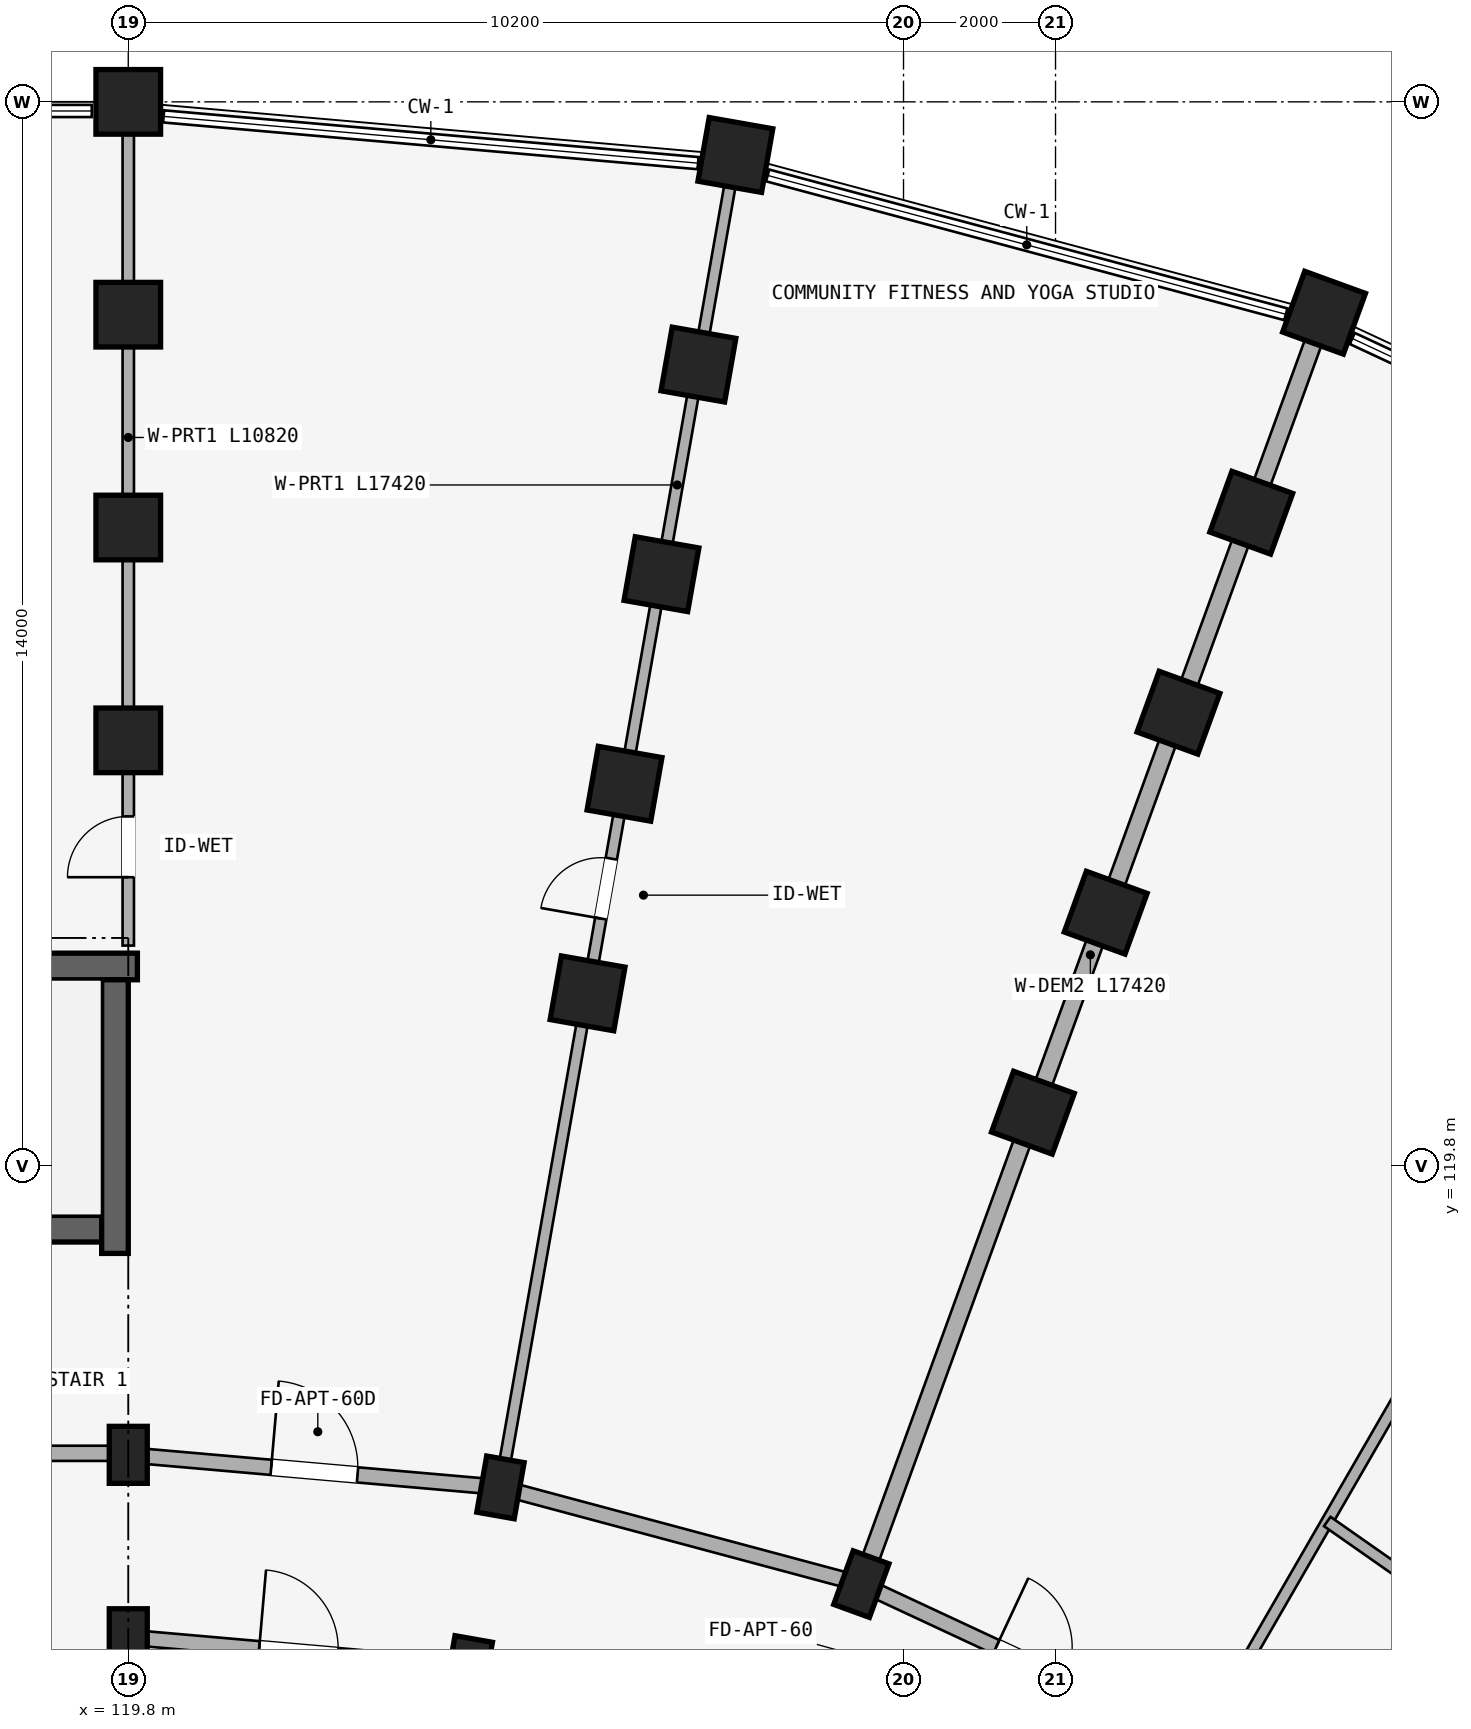
"""IFC4 building model, lengths in metres.
Left out: names, types, materials, properties, quantities, classifications, styles, units other than length and angle.
Written with IfcOpenShell. Run it as: python <this file> out.ifc"""

import sys

from ifc_helpers import new_model, si_unit, direction, frame, frame_2d, origin, origin_2d, place, context, subcontext, project, spatial, rectangle, extrude, element, fill, save


model = new_model("IFC4")
c1 = context("Model", 3, precision=1e-05, world=origin(), true_north=direction((0.0, 1.0)))
c2 = subcontext(c1, "Body", "Model", "MODEL_VIEW")
j1 = project(units=[si_unit("LENGTHUNIT", "METRE"), si_unit("PLANEANGLEUNIT", "RADIAN")], contexts=[c1])
p1 = place(None, origin())
s1 = spatial("IfcSite", under=j1, at=p1, CompositionType="ELEMENT")
p2 = place(p1, origin())
s2 = spatial("IfcBuilding", under=s1, at=p2, CompositionType="ELEMENT")
p3 = place(p2, frame((0.0, 0.0, 4.5)))
s3 = spatial("IfcBuildingStorey", under=s2, at=p3, CompositionType="ELEMENT", Elevation=4.5)
p4 = place(p3, frame((119.92, 122.425, 0.0), z_axis=(0.0, 0.0, 1.0), x_axis=(-1.0, 0.0, 0.0)))
e1 = element("IfcWall", 1, at=p4, inside=s3, PredefinedType="SHEAR", context=c2, shape_type="SweptSolid", body=[
    extrude(rectangle(XDim=8.545, YDim=0.35, at=frame_2d((4.272, 0.0))), origin(), (0.0, 0.0, 1.0), 3.98),
])
p5 = place(p3, frame((119.45, 118.975, 0.0), z_axis=(0.0, 0.0, 1.0), x_axis=(-1.0, 0.0, 0.0)))
e2 = element("IfcWall", 2, at=p5, inside=s3, PredefinedType="SHEAR", context=c2, shape_type="SweptSolid", body=[
    extrude(rectangle(XDim=8.075, YDim=0.35, at=frame_2d((4.038, 0.0))), origin(), (0.0, 0.0, 1.0), 3.98),
])
p6 = place(p5, frame((6.38, 0.0, 0.0)))
e3 = element("IfcOpeningElement", 3, at=p6, cuts=e2, PredefinedType="OPENING", context=c2, shape_type="SweptSolid", body=[
    extrude(rectangle(XDim=1.24, YDim=2.15, at=frame_2d((0.62, 1.075))), frame((0.0, 0.185, 0.0), z_axis=(0.0, -1.0, 0.0), x_axis=(1.0, 0.0, 0.0)), (0.0, 0.0, 1.0), 0.37),
])
p7 = place(p3, frame((119.625, 118.65, 0.0), z_axis=(0.0, 0.0, 1.0), x_axis=(0.0, 1.0, 0.0)))
e4 = element("IfcWall", 4, at=p7, inside=s3, PredefinedType="SHEAR", context=c2, shape_type="SweptSolid", body=[
    extrude(rectangle(XDim=3.6, YDim=0.35, at=frame_2d((1.8, 0.0))), origin(), (0.0, 0.0, 1.0), 3.98),
])
for number, where, z_axis, x_axis in (
    (5, (119.8, 113.6, 0.0), (0.0, 0.0, 1.0), (1.0, 0.0, 0.0)),
    (6, (119.8, 116.0, 0.0), (0.0, 0.0, 1.0), (1.0, 0.0, 0.0)),
):
    element("IfcColumn", number, at=place(p3, frame(where, z_axis=z_axis, x_axis=x_axis)), inside=s3, PredefinedType="COLUMN", context=c2, shape_type="SweptSolid", body=[
        extrude(rectangle(XDim=0.5, YDim=0.75, at=origin_2d()), origin(), (0.0, 0.0, 1.0), 3.98),
    ])
for number, where, z_axis, x_axis in (
    (7, (119.8, 125.4, 0.0), (0.0, 0.0, 1.0), (1.0, 0.0, 0.0)),
    (8, (119.8, 128.2, 0.0), (0.0, 0.0, 1.0), (1.0, 0.0, 0.0)),
    (9, (119.8, 131.0, 0.0), (0.0, 0.0, 1.0), (1.0, 0.0, 0.0)),
    (10, (119.8, 133.8, 0.0), (0.0, 0.0, 1.0), (1.0, 0.0, 0.0)),
):
    element("IfcColumn", number, at=place(p3, frame(where, z_axis=z_axis, x_axis=x_axis)), inside=s3, PredefinedType="COLUMN", context=c2, shape_type="SweptSolid", body=[
        extrude(rectangle(XDim=0.85, YDim=0.85, at=origin_2d()), origin(), (0.0, 0.0, 1.0), 3.98),
    ])
for number, where, z_axis, x_axis in (
    (11, (124.28, 113.208, 0.0), (0.0, 0.0, 1.0), (-0.985, 0.174, 0.0)),
    (12, (124.697, 115.572, 0.0), (0.0, 0.0, 1.0), (-0.985, 0.174, 0.0)),
):
    element("IfcColumn", number, at=place(p3, frame(where, z_axis=z_axis, x_axis=x_axis)), inside=s3, PredefinedType="COLUMN", context=c2, shape_type="SweptSolid", body=[
        extrude(rectangle(XDim=0.5, YDim=0.75, at=origin_2d()), origin(), (0.0, 0.0, 1.0), 3.98),
    ])
for number, where, z_axis, x_axis in (
    (13, (125.843, 122.071, 0.0), (0.0, 0.0, 1.0), (-0.985, 0.174, 0.0)),
    (14, (126.329, 124.829, 0.0), (0.0, 0.0, 1.0), (-0.985, 0.174, 0.0)),
    (15, (126.815, 127.586, 0.0), (0.0, 0.0, 1.0), (-0.985, 0.174, 0.0)),
    (16, (127.302, 130.344, 0.0), (0.0, 0.0, 1.0), (-0.985, 0.174, 0.0)),
    (17, (127.788, 133.101, 0.0), (0.0, 0.0, 1.0), (-0.985, 0.174, 0.0)),
):
    element("IfcColumn", number, at=place(p3, frame(where, z_axis=z_axis, x_axis=x_axis)), inside=s3, PredefinedType="COLUMN", context=c2, shape_type="SweptSolid", body=[
        extrude(rectangle(XDim=0.85, YDim=0.85, at=origin_2d()), origin(), (0.0, 0.0, 1.0), 3.98),
    ])
p8 = place(p3, frame((129.445, 114.299, 0.0), z_axis=(0.0, 0.0, 1.0), x_axis=(-0.939692620786, 0.342020143326, 0.0)))
e18 = element("IfcColumn", 18, at=p8, inside=s3, PredefinedType="COLUMN", context=c2, shape_type="SweptSolid", body=[
    extrude(rectangle(XDim=0.5, YDim=0.75, at=origin_2d()), origin(), (0.0, 0.0, 1.0), 3.98),
])
for number, where, z_axis, x_axis in (
    (19, (131.702, 120.501, 0.0), (0.0, 0.0, 1.0), (-0.94, 0.342, 0.0)),
    (20, (132.66, 123.132, 0.0), (0.0, 0.0, 1.0), (-0.94, 0.342, 0.0)),
    (21, (133.618, 125.764, 0.0), (0.0, 0.0, 1.0), (-0.94, 0.342, 0.0)),
    (22, (134.575, 128.395, 0.0), (0.0, 0.0, 1.0), (-0.94, 0.342, 0.0)),
    (23, (135.533, 131.026, 0.0), (0.0, 0.0, 1.0), (-0.94, 0.342, 0.0)),
):
    element("IfcColumn", number, at=place(p3, frame(where, z_axis=z_axis, x_axis=x_axis)), inside=s3, PredefinedType="COLUMN", context=c2, shape_type="SweptSolid", body=[
        extrude(rectangle(XDim=0.85, YDim=0.85, at=origin_2d()), origin(), (0.0, 0.0, 1.0), 3.98),
    ])
p9 = place(p3, frame((119.55, 116.02, 0.0), z_axis=(0.0, 0.0, 1.0), x_axis=(-1.0, 0.0, 0.0)))
e24 = element("IfcWall", 24, at=p9, inside=s3, PredefinedType="STANDARD", context=c2, shape_type="SweptSolid", body=[
    extrude(rectangle(XDim=5.25, YDim=0.2, at=frame_2d((2.625, 0.0))), origin(), (0.0, 0.0, 1.0), 3.322),
])
p10 = place(p9, frame((2.165, 0.0, 0.0)))
e25 = element("IfcOpeningElement", 25, at=p10, cuts=e24, PredefinedType="OPENING", context=c2, shape_type="SweptSolid", body=[
    extrude(rectangle(XDim=0.92, YDim=2.1, at=frame_2d((0.46, 1.05))), frame((0.0, 0.11, 0.0), z_axis=(0.0, -1.0, 0.0), x_axis=(1.0, 0.0, 0.0)), (0.0, 0.0, 1.0), 0.22),
])
p11 = place(p3, frame((119.8, 113.6, 0.0), z_axis=(0.0, 0.0, 1.0), x_axis=(0.996191949488, -0.087187153726, 0.0)))
e26 = element("IfcWall", 26, at=p11, inside=s3, PredefinedType="STANDARD", context=c2, shape_type="SweptSolid", body=[
    extrude(rectangle(XDim=4.497, YDim=0.2, at=frame_2d((2.249, 0.0))), origin(), (0.0, 0.0, 1.0), 3.322),
])
p12 = place(p11, frame((1.729, 0.0, 0.0)))
e27 = element("IfcOpeningElement", 27, at=p12, cuts=e26, PredefinedType="OPENING", context=c2, shape_type="SweptSolid", body=[
    extrude(rectangle(XDim=1.04, YDim=2.15, at=frame_2d((0.52, 1.075))), frame((0.0, 0.11, 0.0), z_axis=(0.0, -1.0, 0.0), x_axis=(1.0, 0.0, 0.0)), (0.0, 0.0, 1.0), 0.22),
])
p13 = place(p3, frame((119.8, 116.0, 0.0), z_axis=(0.0, 0.0, 1.0), x_axis=(0.996193663584, -0.087167566415, 0.0)))
e28 = element("IfcWall", 28, at=p13, inside=s3, PredefinedType="STANDARD", context=c2, shape_type="SweptSolid", body=[
    extrude(rectangle(XDim=4.916, YDim=0.2, at=frame_2d((2.458, 0.0))), origin(), (0.0, 0.0, 1.0), 3.322),
])
p14 = place(p13, frame((1.888, 0.0, 0.0)))
e29 = element("IfcOpeningElement", 29, at=p14, cuts=e28, PredefinedType="OPENING", context=c2, shape_type="SweptSolid", body=[
    extrude(rectangle(XDim=1.14, YDim=2.15, at=frame_2d((0.57, 1.075))), frame((0.0, 0.11, 0.0), z_axis=(0.0, -1.0, 0.0), x_axis=(1.0, 0.0, 0.0)), (0.0, 0.0, 1.0), 0.22),
])
p15 = place(p3, frame((124.697, 115.572, 0.0), z_axis=(0.0, 0.0, 1.0), x_axis=(0.965930095386, -0.258803112091, 0.0)))
e30 = element("IfcWall", 30, at=p15, inside=s3, PredefinedType="STANDARD", context=c2, shape_type="SweptSolid", body=[
    extrude(rectangle(XDim=4.916, YDim=0.2, at=frame_2d((2.458, 0.0))), origin(), (0.0, 0.0, 1.0), 3.322),
])
p16 = place(p3, frame((129.445, 114.299, 0.0), z_axis=(0.0, 0.0, 1.0), x_axis=(0.906302381024, -0.422629854778, 0.0)))
e31 = element("IfcWall", 31, at=p16, inside=s3, PredefinedType="STANDARD", context=c2, shape_type="SweptSolid", body=[
    extrude(rectangle(XDim=4.915, YDim=0.2, at=frame_2d((2.458, 0.0))), origin(), (0.0, 0.0, 1.0), 3.322),
])
p17 = place(p16, frame((1.958, 0.0, 0.0)))
e32 = element("IfcOpeningElement", 32, at=p17, cuts=e31, PredefinedType="OPENING", context=c2, shape_type="SweptSolid", body=[
    extrude(rectangle(XDim=1.0, YDim=2.15, at=frame_2d((0.5, 1.075))), frame((0.0, 0.11, 0.0), z_axis=(0.0, -1.0, 0.0), x_axis=(1.0, 0.0, 0.0)), (0.0, 0.0, 1.0), 0.22),
])
p18 = place(p3, frame((119.8, 110.35, 0.0), z_axis=(0.0, 0.0, 1.0), x_axis=(0.0, 1.0, 0.0)))
e33 = element("IfcWall", 33, at=p18, inside=s3, PredefinedType="STANDARD", context=c2, shape_type="SweptSolid", body=[
    extrude(rectangle(XDim=3.2, YDim=0.22, at=frame_2d((1.6, 0.0))), origin(), (0.0, 0.0, 1.0), 3.322),
])
p19 = place(p3, frame((119.8, 122.7, 0.0), z_axis=(0.0, 0.0, 1.0), x_axis=(0.0, 1.0, 0.0)))
e34 = element("IfcWall", 34, at=p19, inside=s3, PredefinedType="PARTITIONING", context=c2, shape_type="SweptSolid", body=[
    extrude(rectangle(XDim=10.82, YDim=0.15, at=frame_2d((5.41, 0.0))), origin(), (0.0, 0.0, 1.0), 3.322),
])
p20 = place(p19, frame((0.899, 0.0, 0.0)))
e35 = element("IfcOpeningElement", 35, at=p20, cuts=e34, PredefinedType="OPENING", context=c2, shape_type="SweptSolid", body=[
    extrude(rectangle(XDim=0.8, YDim=2.1, at=frame_2d((0.4, 1.05))), frame((0.0, 0.085, 0.0), z_axis=(0.0, -1.0, 0.0), x_axis=(1.0, 0.0, 0.0)), (0.0, 0.0, 1.0), 0.17),
])
p21 = place(p3, frame((124.714, 115.67, 0.0), z_axis=(0.0, 0.0, 1.0), x_axis=(0.173646216546, 0.984808098809, 0.0)))
e36 = element("IfcWall", 36, at=p21, inside=s3, PredefinedType="PARTITIONING", context=c2, shape_type="SweptSolid", body=[
    extrude(rectangle(XDim=17.42, YDim=0.15, at=frame_2d((8.71, 0.0))), origin(), (0.0, 0.0, 1.0), 3.322),
])
p22 = place(p21, frame((7.5, 0.0, 0.0)))
e37 = element("IfcOpeningElement", 37, at=p22, cuts=e36, PredefinedType="OPENING", context=c2, shape_type="SweptSolid", body=[
    extrude(rectangle(XDim=0.8, YDim=2.1, at=frame_2d((0.4, 1.05))), frame((0.0, 0.085, 0.0), z_axis=(0.0, -1.0, 0.0), x_axis=(1.0, 0.0, 0.0)), (0.0, 0.0, 1.0), 0.17),
])
p23 = place(p3, frame((129.479, 114.393, 0.0), z_axis=(0.0, 0.0, 1.0), x_axis=(0.342022120477, 0.939691901159, 0.0)))
e38 = element("IfcWall", 38, at=p23, inside=s3, PredefinedType="STANDARD", context=c2, shape_type="SweptSolid", body=[
    extrude(rectangle(XDim=17.42, YDim=0.23, at=frame_2d((8.71, 0.0))), origin(), (0.0, 0.0, 1.0), 3.322),
])
p24 = place(p3, frame((133.95, 112.309, 0.0), z_axis=(0.0, 0.0, 1.0), x_axis=(0.499997843263, 0.866026648973, 0.0)))
e39 = element("IfcWall", 39, at=p24, inside=s3, PredefinedType="PARTITIONING", context=c2, shape_type="SweptSolid", body=[
    extrude(rectangle(XDim=17.42, YDim=0.15, at=frame_2d((8.71, 0.0))), origin(), (0.0, 0.0, 1.0), 3.322),
])
p25 = place(p24, frame((7.5, 0.0, 0.0)))
e40 = element("IfcOpeningElement", 40, at=p25, cuts=e39, PredefinedType="OPENING", context=c2, shape_type="SweptSolid", body=[
    extrude(rectangle(XDim=0.8, YDim=2.1, at=frame_2d((0.4, 1.05))), frame((0.0, 0.085, 0.0), z_axis=(0.0, -1.0, 0.0), x_axis=(1.0, 0.0, 0.0)), (0.0, 0.0, 1.0), 0.17),
])
p26 = place(p3, frame((135.575, 115.123, 0.0), z_axis=(0.0, 0.0, 1.0), x_axis=(0.819156831143, -0.573569599955, 0.0)))
e41 = element("IfcWall", 41, at=p26, inside=s3, PredefinedType="PLUMBINGWALL", context=c2, shape_type="SweptSolid", body=[
    extrude(rectangle(XDim=5.5, YDim=0.15, at=frame_2d((2.75, 0.0))), origin(), (0.0, 0.0, 1.0), 3.322),
])
p27 = place(p26, frame((2.33, 0.0, 0.0)))
e42 = element("IfcOpeningElement", 42, at=p27, cuts=e41, PredefinedType="OPENING", context=c2, shape_type="SweptSolid", body=[
    extrude(rectangle(XDim=0.84, YDim=2.1, at=frame_2d((0.42, 1.05))), frame((0.0, 0.085, 0.0), z_axis=(0.0, -1.0, 0.0), x_axis=(1.0, 0.0, 0.0)), (0.0, 0.0, 1.0), 0.17),
])
p28 = place(p20, origin())
e43 = element("IfcDoor", 43, at=p28, inside=s3, OperationType="SINGLE_SWING_LEFT", PredefinedType="DOOR", context=c2, shape_type="SweptSolid", body=[
    extrude(rectangle(XDim=0.8, YDim=2.1, at=frame_2d((0.4, 1.05))), frame((0.0, 0.025, 0.0), z_axis=(0.0, -1.0, 0.0), x_axis=(1.0, 0.0, 0.0)), (0.0, 0.0, 1.0), 0.05),
])
fill(e35, e43)
p29 = place(p22, origin())
e44 = element("IfcDoor", 44, at=p29, inside=s3, OperationType="SINGLE_SWING_LEFT", PredefinedType="DOOR", context=c2, shape_type="SweptSolid", body=[
    extrude(rectangle(XDim=0.8, YDim=2.1, at=frame_2d((0.4, 1.05))), frame((0.0, 0.025, 0.0), z_axis=(0.0, -1.0, 0.0), x_axis=(1.0, 0.0, 0.0)), (0.0, 0.0, 1.0), 0.05),
])
fill(e37, e44)
p30 = place(p14, frame((1.14, 0.0, 0.0), z_axis=(0.0, 0.0, 1.0), x_axis=(-1.0, 0.0, 0.0)))
e45 = element("IfcDoor", 45, at=p30, inside=s3, OperationType="SINGLE_SWING_RIGHT", PredefinedType="DOOR", context=c2, shape_type="SweptSolid", body=[
    extrude(rectangle(XDim=1.14, YDim=2.15, at=frame_2d((0.57, 1.075))), frame((0.0, 0.025, 0.0), z_axis=(0.0, -1.0, 0.0), x_axis=(1.0, 0.0, 0.0)), (0.0, 0.0, 1.0), 0.05),
])
fill(e29, e45)
p31 = place(p17, origin())
e46 = element("IfcDoor", 46, at=p31, inside=s3, OperationType="SINGLE_SWING_LEFT", PredefinedType="DOOR", context=c2, shape_type="SweptSolid", body=[
    extrude(rectangle(XDim=1.0, YDim=2.15, at=frame_2d((0.5, 1.075))), frame((0.0, 0.025, 0.0), z_axis=(0.0, -1.0, 0.0), x_axis=(1.0, 0.0, 0.0)), (0.0, 0.0, 1.0), 0.05),
])
fill(e32, e46)
p32 = place(p12, origin())
e47 = element("IfcDoor", 47, at=p32, inside=s3, OperationType="SINGLE_SWING_LEFT", PredefinedType="DOOR", context=c2, shape_type="SweptSolid", body=[
    extrude(rectangle(XDim=1.04, YDim=2.15, at=frame_2d((0.52, 1.075))), frame((0.0, 0.025, 0.0), z_axis=(0.0, -1.0, 0.0), x_axis=(1.0, 0.0, 0.0)), (0.0, 0.0, 1.0), 0.05),
])
fill(e27, e47)
save(model, sys.argv[1])
